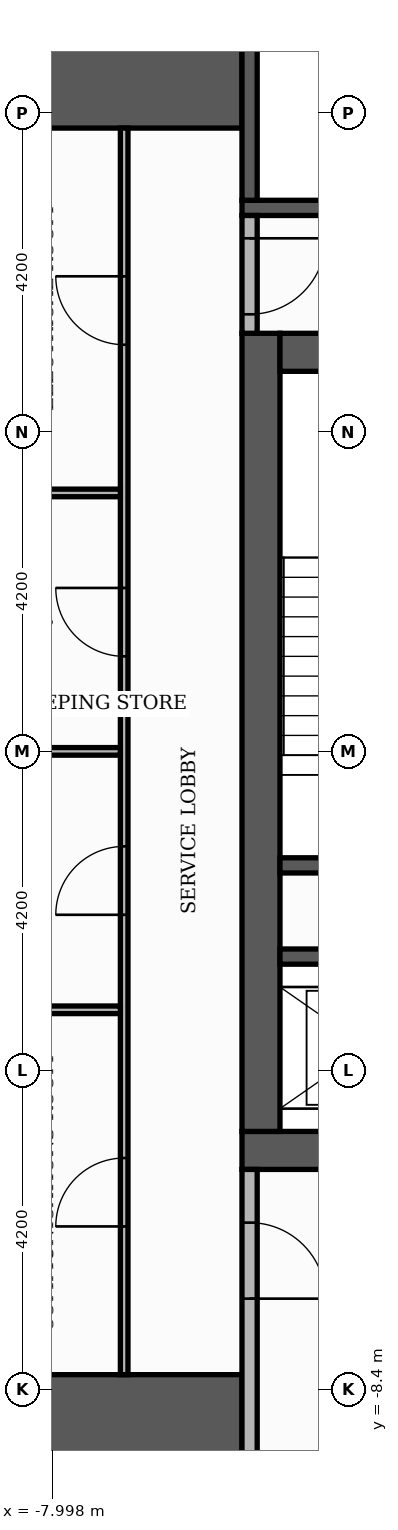
"""IFC4 building model, lengths in metres.
Left out: names, types, materials, properties, quantities, classifications, styles, units other than length and angle.
Written with IfcOpenShell. Run it as: python <this file> out.ifc"""

import sys

from ifc_helpers import new_model, si_unit, direction, frame, frame_2d, origin, place, context, subcontext, project, spatial, rectangle, extrude, element, fill, save


model = new_model("IFC4")
c1 = context("Model", 3, precision=1e-05, world=origin(), true_north=direction((0.0, 1.0)))
c2 = subcontext(c1, "Body", "Model", "MODEL_VIEW")
j1 = project(units=[si_unit("LENGTHUNIT", "METRE"), si_unit("PLANEANGLEUNIT", "RADIAN")], contexts=[c1])
p1 = place(None, origin())
s1 = spatial("IfcSite", under=j1, at=p1, CompositionType="ELEMENT")
p2 = place(p1, origin())
s2 = spatial("IfcBuilding", under=s1, at=p2, CompositionType="ELEMENT")
p3 = place(p2, frame((0.0, 0.0, 196.2)))
s3 = spatial("IfcBuildingStorey", under=s2, at=p3, CompositionType="ELEMENT", Elevation=196.2)
p4 = place(p3, frame((-5.5, -5.25, 0.0), z_axis=(0.0, 0.0, 1.0), x_axis=(1.0, 0.0, 0.0)))
e1 = element("IfcWall", 1, at=p4, inside=s3, PredefinedType="SHEAR", context=c2, shape_type="SweptSolid", body=[
    extrude(rectangle(XDim=11.0, YDim=0.5, at=frame_2d((5.5, 0.0))), origin(), (0.0, 0.0, 1.0), 3.48),
])
p5 = place(p4, frame((4.9, 0.0, 0.0)))
e2 = element("IfcOpeningElement", 2, at=p5, cuts=e1, PredefinedType="OPENING", context=c2, shape_type="SweptSolid", body=[
    extrude(rectangle(XDim=1.2, YDim=2.1, at=frame_2d((0.6, 1.05))), frame((0.0, 0.26, 0.0), z_axis=(0.0, -1.0, 0.0), x_axis=(1.0, 0.0, 0.0)), (0.0, 0.0, 1.0), 0.52),
])
p6 = place(p3, frame((-5.25, -5.0, 0.0), z_axis=(0.0, 0.0, 1.0), x_axis=(0.0, 1.0, 0.0)))
e3 = element("IfcWall", 3, at=p6, inside=s3, PredefinedType="SHEAR", context=c2, shape_type="SweptSolid", body=[
    extrude(rectangle(XDim=10.5, YDim=0.5, at=frame_2d((5.25, 0.0))), origin(), (0.0, 0.0, 1.0), 3.48),
])
p7 = place(p3, frame((-5.0, 5.25, 0.0), z_axis=(0.0, 0.0, 1.0), x_axis=(1.0, 0.0, 0.0)))
e4 = element("IfcWall", 4, at=p7, inside=s3, PredefinedType="SHEAR", context=c2, shape_type="SweptSolid", body=[
    extrude(rectangle(XDim=10.0, YDim=0.5, at=frame_2d((5.0, 0.0))), origin(), (0.0, 0.0, 1.0), 3.48),
])
p8 = place(p7, frame((4.4, 0.0, 0.0)))
e5 = element("IfcOpeningElement", 5, at=p8, cuts=e4, PredefinedType="OPENING", context=c2, shape_type="SweptSolid", body=[
    extrude(rectangle(XDim=1.2, YDim=2.1, at=frame_2d((0.6, 1.05))), frame((0.0, 0.26, 0.0), z_axis=(0.0, -1.0, 0.0), x_axis=(1.0, 0.0, 0.0)), (0.0, 0.0, 1.0), 0.52),
])
for number, where, z_axis, x_axis in (
    (6, (-10.1, -9.15, 0.0), (0.0, 0.0, 1.0), (1.0, 0.0, 0.0)),
    (7, (-10.1, 9.15, 0.0), (0.0, 0.0, 1.0), (1.0, 0.0, 0.0)),
):
    element("IfcWall", number, at=place(p3, frame(where, z_axis=z_axis, x_axis=x_axis)), inside=s3, PredefinedType="SHEAR", context=c2, shape_type="SweptSolid", body=[
        extrude(rectangle(XDim=4.6, YDim=1.9, at=frame_2d((2.3, 0.0))), origin(), (0.0, 0.0, 1.0), 3.48),
    ])
p9 = place(p3, frame((-5.0, -1.5, 0.0), z_axis=(0.0, 0.0, 1.0), x_axis=(1.0, 0.0, 0.0)))
e8 = element("IfcWall", 8, at=p9, inside=s3, PredefinedType="SHEAR", context=c2, shape_type="SweptSolid", body=[
    extrude(rectangle(XDim=3.05, YDim=0.2, at=frame_2d((1.525, 0.0))), origin(), (0.0, 0.0, 1.0), 3.48),
])
p10 = place(p3, frame((-5.5, 7.15, 0.0), z_axis=(0.0, 0.0, 1.0), x_axis=(1.0, 0.0, 0.0)))
e9 = element("IfcWall", 9, at=p10, inside=s3, PredefinedType="SHEAR", context=c2, shape_type="SweptSolid", body=[
    extrude(rectangle(XDim=6.8, YDim=0.2, at=frame_2d((3.4, 0.0))), origin(), (0.0, 0.0, 1.0), 3.48),
])
for number, where, z_axis, x_axis in (
    (10, (-5.4, 7.25, 0.0), (0.0, 0.0, 1.0), (0.0, 1.0, 0.0)),
    (11, (-5.0, -2.7, 0.0), (0.0, 0.0, 1.0), (1.0, 0.0, 0.0)),
):
    element("IfcWall", number, at=place(p3, frame(where, z_axis=z_axis, x_axis=x_axis)), inside=s3, PredefinedType="SHEAR", context=c2, shape_type="SweptSolid", body=[
        extrude(rectangle(XDim=2.85, YDim=0.2, at=frame_2d((1.425, 0.0))), origin(), (0.0, 0.0, 1.0), 3.48),
    ])
p11 = place(p3, frame((-5.4, -10.1, 0.0), z_axis=(0.0, 0.0, 1.0), x_axis=(0.0, 1.0, 0.0)))
e12 = element("IfcWall", 12, at=p11, inside=s3, PredefinedType="PARTITIONING", context=c2, shape_type="SweptSolid", body=[
    extrude(rectangle(XDim=4.6, YDim=0.2, at=frame_2d((2.3, 0.0))), origin(), (0.0, 0.0, 1.0), 3.48),
])
p12 = place(p11, frame((2.9, 0.0, 0.0)))
e13 = element("IfcOpeningElement", 13, at=p12, cuts=e12, PredefinedType="OPENING", context=c2, shape_type="SweptSolid", body=[
    extrude(rectangle(XDim=1.0, YDim=2.1, at=frame_2d((0.5, 1.05))), frame((0.0, 0.11, 0.0), z_axis=(0.0, -1.0, 0.0), x_axis=(1.0, 0.0, 0.0)), (0.0, 0.0, 1.0), 0.22),
])
p13 = place(p3, frame((-7.05, -8.2, 0.0), z_axis=(0.0, 0.0, 1.0), x_axis=(0.0, 1.0, 0.0)))
e14 = element("IfcWall", 14, at=p13, inside=s3, PredefinedType="PARTITIONING", context=c2, shape_type="SweptSolid", body=[
    extrude(rectangle(XDim=16.4, YDim=0.1, at=frame_2d((8.2, 0.0))), origin(), (0.0, 0.0, 1.0), 3.48),
])
p14 = place(p13, frame((1.95, 0.0, 0.0)))
e15 = element("IfcOpeningElement", 15, at=p14, cuts=e14, PredefinedType="OPENING", context=c2, shape_type="SweptSolid", body=[
    extrude(rectangle(XDim=0.9, YDim=2.1, at=frame_2d((0.45, 1.05))), frame((0.0, 0.06, 0.0), z_axis=(0.0, -1.0, 0.0), x_axis=(1.0, 0.0, 0.0)), (0.0, 0.0, 1.0), 0.12),
])
p15 = place(p13, frame((6.05, 0.0, 0.0)))
e16 = element("IfcOpeningElement", 16, at=p15, cuts=e14, PredefinedType="OPENING", context=c2, shape_type="SweptSolid", body=[
    extrude(rectangle(XDim=0.9, YDim=2.1, at=frame_2d((0.45, 1.05))), frame((0.0, 0.06, 0.0), z_axis=(0.0, -1.0, 0.0), x_axis=(1.0, 0.0, 0.0)), (0.0, 0.0, 1.0), 0.12),
])
p16 = place(p13, frame((9.45, 0.0, 0.0)))
e17 = element("IfcOpeningElement", 17, at=p16, cuts=e14, PredefinedType="OPENING", context=c2, shape_type="SweptSolid", body=[
    extrude(rectangle(XDim=0.9, YDim=2.1, at=frame_2d((0.45, 1.05))), frame((0.0, 0.06, 0.0), z_axis=(0.0, -1.0, 0.0), x_axis=(1.0, 0.0, 0.0)), (0.0, 0.0, 1.0), 0.12),
])
p17 = place(p13, frame((13.55, 0.0, 0.0)))
e18 = element("IfcOpeningElement", 18, at=p17, cuts=e14, PredefinedType="OPENING", context=c2, shape_type="SweptSolid", body=[
    extrude(rectangle(XDim=0.9, YDim=2.1, at=frame_2d((0.45, 1.05))), frame((0.0, 0.06, 0.0), z_axis=(0.0, -1.0, 0.0), x_axis=(1.0, 0.0, 0.0)), (0.0, 0.0, 1.0), 0.12),
])
for number, where, z_axis, x_axis in (
    (19, (-9.0, -3.4, 0.0), (0.0, 0.0, 1.0), (1.0, 0.0, 0.0)),
    (20, (-9.0, 0.0, 0.0), (0.0, 0.0, 1.0), (1.0, 0.0, 0.0)),
    (21, (-9.0, 3.4, 0.0), (0.0, 0.0, 1.0), (1.0, 0.0, 0.0)),
):
    element("IfcWall", number, at=place(p3, frame(where, z_axis=z_axis, x_axis=x_axis)), inside=s3, PredefinedType="PARTITIONING", context=c2, shape_type="SweptSolid", body=[
        extrude(rectangle(XDim=1.9, YDim=0.1, at=frame_2d((0.95, 0.0))), origin(), (0.0, 0.0, 1.0), 3.48),
    ])
p18 = place(p3, frame((-5.4, 5.5, 0.0), z_axis=(0.0, 0.0, 1.0), x_axis=(0.0, 1.0, 0.0)))
e22 = element("IfcWall", 22, at=p18, inside=s3, PredefinedType="PARTITIONING", context=c2, shape_type="SweptSolid", body=[
    extrude(rectangle(XDim=1.55, YDim=0.2, at=frame_2d((0.775, 0.0))), origin(), (0.0, 0.0, 1.0), 3.48),
])
p19 = place(p18, frame((0.25, 0.0, 0.0)))
e23 = element("IfcOpeningElement", 23, at=p19, cuts=e22, PredefinedType="OPENING", context=c2, shape_type="SweptSolid", body=[
    extrude(rectangle(XDim=1.0, YDim=2.1, at=frame_2d((0.5, 1.05))), frame((0.0, 0.11, 0.0), z_axis=(0.0, -1.0, 0.0), x_axis=(1.0, 0.0, 0.0)), (0.0, 0.0, 1.0), 0.22),
])
p20 = place(p19, frame((1.0, 0.0, 0.0), z_axis=(0.0, 0.0, 1.0), x_axis=(-1.0, 0.0, 0.0)))
e24 = element("IfcDoor", 24, at=p20, inside=s3, OperationType="SINGLE_SWING_RIGHT", PredefinedType="DOOR", context=c2, shape_type="SweptSolid", body=[
    extrude(rectangle(XDim=1.0, YDim=2.1, at=frame_2d((0.5, 1.05))), frame((0.0, 0.025, 0.0), z_axis=(0.0, -1.0, 0.0), x_axis=(1.0, 0.0, 0.0)), (0.0, 0.0, 1.0), 0.05),
])
fill(e23, e24)
p21 = place(p12, frame((1.0, 0.0, 0.0), z_axis=(0.0, 0.0, 1.0), x_axis=(-1.0, 0.0, 0.0)))
e25 = element("IfcDoor", 25, at=p21, inside=s3, OperationType="SINGLE_SWING_LEFT", PredefinedType="DOOR", context=c2, shape_type="SweptSolid", body=[
    extrude(rectangle(XDim=1.0, YDim=2.1, at=frame_2d((0.5, 1.05))), frame((0.0, 0.025, 0.0), z_axis=(0.0, -1.0, 0.0), x_axis=(1.0, 0.0, 0.0)), (0.0, 0.0, 1.0), 0.05),
])
fill(e13, e25)
p22 = place(p14, origin())
e26 = element("IfcDoor", 26, at=p22, inside=s3, OperationType="SINGLE_SWING_LEFT", PredefinedType="DOOR", context=c2, shape_type="SweptSolid", body=[
    extrude(rectangle(XDim=0.9, YDim=2.1, at=frame_2d((0.45, 1.05))), frame((0.0, 0.025, 0.0), z_axis=(0.0, -1.0, 0.0), x_axis=(1.0, 0.0, 0.0)), (0.0, 0.0, 1.0), 0.05),
])
fill(e15, e26)
p23 = place(p15, origin())
e27 = element("IfcDoor", 27, at=p23, inside=s3, OperationType="SINGLE_SWING_LEFT", PredefinedType="DOOR", context=c2, shape_type="SweptSolid", body=[
    extrude(rectangle(XDim=0.9, YDim=2.1, at=frame_2d((0.45, 1.05))), frame((0.0, 0.025, 0.0), z_axis=(0.0, -1.0, 0.0), x_axis=(1.0, 0.0, 0.0)), (0.0, 0.0, 1.0), 0.05),
])
fill(e16, e27)
p24 = place(p16, origin())
e28 = element("IfcDoor", 28, at=p24, inside=s3, OperationType="SINGLE_SWING_RIGHT", PredefinedType="DOOR", context=c2, shape_type="SweptSolid", body=[
    extrude(rectangle(XDim=0.9, YDim=2.1, at=frame_2d((0.45, 1.05))), frame((0.0, 0.025, 0.0), z_axis=(0.0, -1.0, 0.0), x_axis=(1.0, 0.0, 0.0)), (0.0, 0.0, 1.0), 0.05),
])
fill(e17, e28)
p25 = place(p17, origin())
e29 = element("IfcDoor", 29, at=p25, inside=s3, OperationType="SINGLE_SWING_RIGHT", PredefinedType="DOOR", context=c2, shape_type="SweptSolid", body=[
    extrude(rectangle(XDim=0.9, YDim=2.1, at=frame_2d((0.45, 1.05))), frame((0.0, 0.025, 0.0), z_axis=(0.0, -1.0, 0.0), x_axis=(1.0, 0.0, 0.0)), (0.0, 0.0, 1.0), 0.05),
])
fill(e18, e29)
save(model, sys.argv[1])
